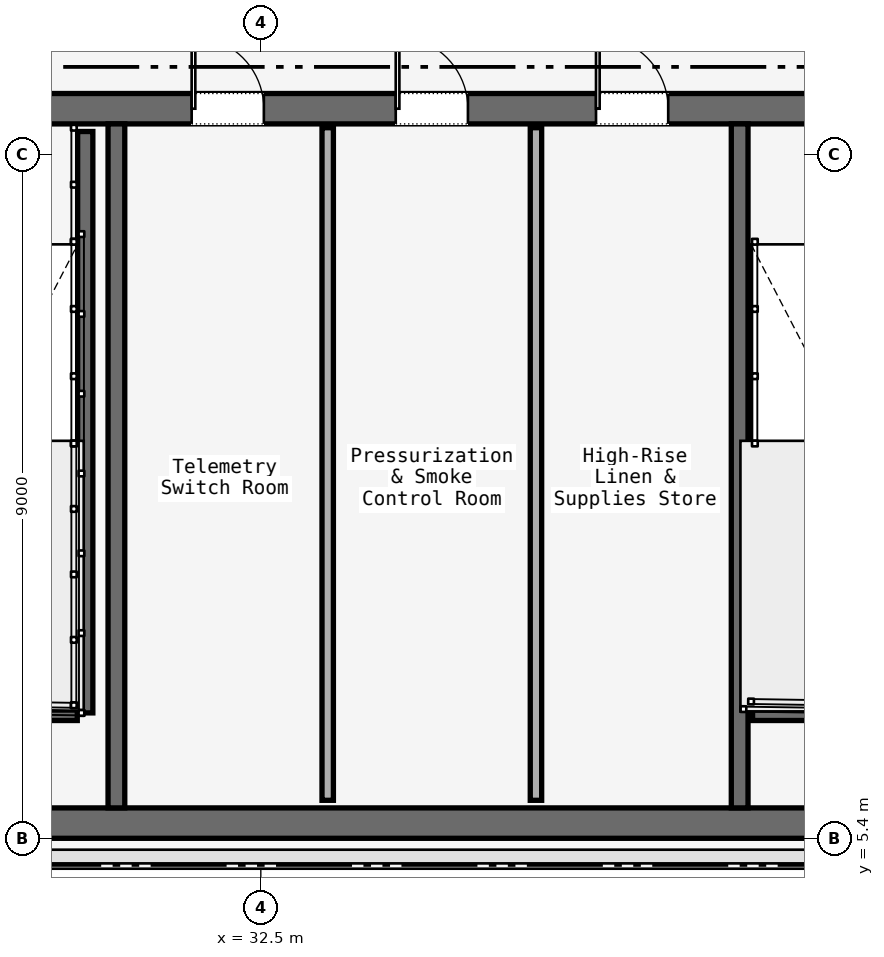
"""IFC4 building model, lengths in metres.
Left out: names, types, materials, properties, quantities, classifications, styles, units other than length and angle.
Written with IfcOpenShell. Run it as: python <this file> out.ifc"""

import sys

from ifc_helpers import new_model, si_unit, direction, frame, frame_2d, origin, place, context, subcontext, project, spatial, rectangle, extrude, element, fill, save


model = new_model("IFC4")
c1 = context("Model", 3, precision=1e-05, world=origin(), true_north=direction((0.0, 1.0)))
c2 = subcontext(c1, "Body", "Model", "MODEL_VIEW")
j1 = project(units=[si_unit("LENGTHUNIT", "METRE"), si_unit("PLANEANGLEUNIT", "RADIAN")], contexts=[c1])
p1 = place(None, origin())
s1 = spatial("IfcSite", under=j1, at=p1, CompositionType="ELEMENT")
p2 = place(p1, origin())
s2 = spatial("IfcBuilding", under=s1, at=p2, CompositionType="ELEMENT")
p3 = place(p2, frame((0.0, 0.0, 218.0)))
s3 = spatial("IfcBuildingStorey", under=s2, at=p3, CompositionType="ELEMENT", Elevation=218.0)
p4 = place(p3, frame((26.45, 15.0, 0.0), z_axis=(0.0, 0.0, 1.0), x_axis=(1.0, 0.0, 0.0)))
e1 = element("IfcWall", 1, at=p4, inside=s3, PredefinedType="SOLIDWALL", context=c2, shape_type="SweptSolid", body=[
    extrude(rectangle(XDim=31.1, YDim=0.4, at=frame_2d((15.55, 0.0))), origin(), (0.0, 0.0, 1.0), 3.58),
])
p5 = place(p4, frame((1.65, 0.0, 0.0)))
e2 = element("IfcOpeningElement", 2, at=p5, cuts=e1, PredefinedType="OPENING", context=c2, shape_type="SweptSolid", body=[
    extrude(rectangle(XDim=1.1, YDim=2.2, at=frame_2d((0.55, 1.1))), frame((0.0, 0.2, 0.0), z_axis=(0.0, -1.0, 0.0), x_axis=(1.0, 0.0, 0.0)), (0.0, 0.0, 1.0), 0.4),
])
p6 = place(p4, frame((13.65, 0.0, 0.0)))
e3 = element("IfcOpeningElement", 3, at=p6, cuts=e1, PredefinedType="OPENING", context=c2, shape_type="SweptSolid", body=[
    extrude(rectangle(XDim=1.1, YDim=2.2, at=frame_2d((0.55, 1.1))), frame((0.0, 0.2, 0.0), z_axis=(0.0, -1.0, 0.0), x_axis=(1.0, 0.0, 0.0)), (0.0, 0.0, 1.0), 0.4),
])
p7 = place(p4, frame((25.55, 0.0, 0.0)))
e4 = element("IfcOpeningElement", 4, at=p7, cuts=e1, PredefinedType="OPENING", context=c2, shape_type="SweptSolid", body=[
    extrude(rectangle(XDim=1.1, YDim=2.2, at=frame_2d((0.55, 1.1))), frame((0.0, 0.2, 0.0), z_axis=(0.0, -1.0, 0.0), x_axis=(1.0, 0.0, 0.0)), (0.0, 0.0, 1.0), 0.4),
])
p8 = place(p4, frame((19.35, 0.0, 0.0)))
e5 = element("IfcOpeningElement", 5, at=p8, cuts=e1, PredefinedType="OPENING", context=c2, shape_type="SweptSolid", body=[
    extrude(rectangle(XDim=1.1, YDim=2.2, at=frame_2d((0.55, 1.1))), frame((0.0, 0.2, 0.0), z_axis=(0.0, -1.0, 0.0), x_axis=(1.0, 0.0, 0.0)), (0.0, 0.0, 1.0), 0.4),
])
p9 = place(p4, frame((21.4, 0.0, 0.0)))
e6 = element("IfcOpeningElement", 6, at=p9, cuts=e1, PredefinedType="OPENING", context=c2, shape_type="SweptSolid", body=[
    extrude(rectangle(XDim=0.9, YDim=2.1, at=frame_2d((0.45, 1.05))), frame((0.0, 0.2, 0.0), z_axis=(0.0, -1.0, 0.0), x_axis=(1.0, 0.0, 0.0)), (0.0, 0.0, 1.0), 0.4),
])
p10 = place(p4, frame((5.14, 0.0, 0.0)))
e7 = element("IfcOpeningElement", 7, at=p10, cuts=e1, PredefinedType="OPENING", context=c2, shape_type="SweptSolid", body=[
    extrude(rectangle(XDim=0.95, YDim=2.2, at=frame_2d((0.475, 1.1))), frame((0.0, 0.2, 0.0), z_axis=(0.0, -1.0, 0.0), x_axis=(1.0, 0.0, 0.0)), (0.0, 0.0, 1.0), 0.4),
])
p11 = place(p4, frame((7.825, 0.0, 0.0)))
e8 = element("IfcOpeningElement", 8, at=p11, cuts=e1, PredefinedType="OPENING", context=c2, shape_type="SweptSolid", body=[
    extrude(rectangle(XDim=0.95, YDim=2.2, at=frame_2d((0.475, 1.1))), frame((0.0, 0.2, 0.0), z_axis=(0.0, -1.0, 0.0), x_axis=(1.0, 0.0, 0.0)), (0.0, 0.0, 1.0), 0.4),
])
p12 = place(p4, frame((10.46, 0.0, 0.0)))
e9 = element("IfcOpeningElement", 9, at=p12, cuts=e1, PredefinedType="OPENING", context=c2, shape_type="SweptSolid", body=[
    extrude(rectangle(XDim=0.95, YDim=2.2, at=frame_2d((0.475, 1.1))), frame((0.0, 0.2, 0.0), z_axis=(0.0, -1.0, 0.0), x_axis=(1.0, 0.0, 0.0)), (0.0, 0.0, 1.0), 0.4),
])
p13 = place(p4, frame((23.35, 0.0, 0.0)))
e10 = element("IfcOpeningElement", 10, at=p13, cuts=e1, PredefinedType="OPENING", context=c2, shape_type="SweptSolid", body=[
    extrude(rectangle(XDim=1.3, YDim=2.3, at=frame_2d((0.65, 1.15))), frame((0.0, 0.2, 0.0), z_axis=(0.0, -1.0, 0.0), x_axis=(1.0, 0.0, 0.0)), (0.0, 0.0, 1.0), 0.4),
])
p14 = place(p3, frame((26.45, 5.6, 0.0), z_axis=(0.0, 0.0, 1.0), x_axis=(1.0, 0.0, 0.0)))
e11 = element("IfcWall", 11, at=p14, inside=s3, PredefinedType="SOLIDWALL", context=c2, shape_type="SweptSolid", body=[
    extrude(rectangle(XDim=31.1, YDim=0.4, at=frame_2d((15.55, 0.0))), origin(), (0.0, 0.0, 1.0), 3.58),
])
for number, where, z_axis, x_axis in (
    (12, (30.6, 5.8, 0.0), (0.0, 0.0, 1.0), (0.0, 1.0, 0.0)),
    (13, (38.8, 5.8, 0.0), (0.0, 0.0, 1.0), (0.0, 1.0, 0.0)),
):
    element("IfcWall", number, at=place(p3, frame(where, z_axis=z_axis, x_axis=x_axis)), inside=s3, PredefinedType="SOLIDWALL", context=c2, shape_type="SweptSolid", body=[
        extrude(rectangle(XDim=9.0, YDim=0.22, at=frame_2d((4.5, 0.0))), origin(), (0.0, 0.0, 1.0), 3.58),
    ])
p15 = place(p3, frame((30.19, 14.7, 0.0), z_axis=(0.0, 0.0, 1.0), x_axis=(0.0, -1.0, 0.0)))
e14 = element("IfcWall", 14, at=p15, inside=s3, PredefinedType="SOLIDWALL", context=c2, shape_type="SweptSolid", body=[
    extrude(rectangle(XDim=7.65, YDim=0.2, at=frame_2d((3.825, 0.0))), origin(), (0.0, 0.0, 1.0), 3.8),
])
for number, where, z_axis, x_axis in (
    (15, (26.97, 7.05, 0.0), (0.0, 0.0, 1.0), (1.0, 0.0, 0.0)),
    (16, (38.97, 7.05, 0.0), (0.0, 0.0, 1.0), (1.0, 0.0, 0.0)),
):
    element("IfcWall", number, at=place(p3, frame(where, z_axis=z_axis, x_axis=x_axis)), inside=s3, PredefinedType="SOLIDWALL", context=c2, shape_type="SweptSolid", body=[
        extrude(rectangle(XDim=3.115, YDim=0.2, at=frame_2d((1.558, 0.0))), origin(), (0.0, 0.0, 1.0), 3.8),
    ])
for number, where, z_axis, x_axis in (
    (17, (33.38, 5.9, 0.0), (0.0, 0.0, 1.0), (0.0, 1.0, 0.0)),
    (18, (36.12, 5.9, 0.0), (0.0, 0.0, 1.0), (0.0, 1.0, 0.0)),
):
    element("IfcWall", number, at=place(p3, frame(where, z_axis=z_axis, x_axis=x_axis)), inside=s3, PredefinedType="PARTITIONING", context=c2, shape_type="SweptSolid", body=[
        extrude(rectangle(XDim=8.85, YDim=0.15, at=frame_2d((4.425, 0.0))), origin(), (0.0, 0.0, 1.0), 3.01),
    ])
p16 = place(p10, origin())
e19 = element("IfcDoor", 19, at=p16, inside=s3, OperationType="SINGLE_SWING_LEFT", PredefinedType="DOOR", context=c2, shape_type="SweptSolid", body=[
    extrude(rectangle(XDim=0.95, YDim=2.2, at=frame_2d((0.475, 1.1))), frame((0.0, 0.025, 0.0), z_axis=(0.0, -1.0, 0.0), x_axis=(1.0, 0.0, 0.0)), (0.0, 0.0, 1.0), 0.05),
])
fill(e7, e19)
p17 = place(p11, origin())
e20 = element("IfcDoor", 20, at=p17, inside=s3, OperationType="SINGLE_SWING_RIGHT", PredefinedType="DOOR", context=c2, shape_type="SweptSolid", body=[
    extrude(rectangle(XDim=0.95, YDim=2.2, at=frame_2d((0.475, 1.1))), frame((0.0, 0.025, 0.0), z_axis=(0.0, -1.0, 0.0), x_axis=(1.0, 0.0, 0.0)), (0.0, 0.0, 1.0), 0.05),
])
fill(e8, e20)
p18 = place(p12, origin())
e21 = element("IfcDoor", 21, at=p18, inside=s3, OperationType="SINGLE_SWING_LEFT", PredefinedType="DOOR", context=c2, shape_type="SweptSolid", body=[
    extrude(rectangle(XDim=0.95, YDim=2.2, at=frame_2d((0.475, 1.1))), frame((0.0, 0.025, 0.0), z_axis=(0.0, -1.0, 0.0), x_axis=(1.0, 0.0, 0.0)), (0.0, 0.0, 1.0), 0.05),
])
fill(e9, e21)
save(model, sys.argv[1])
